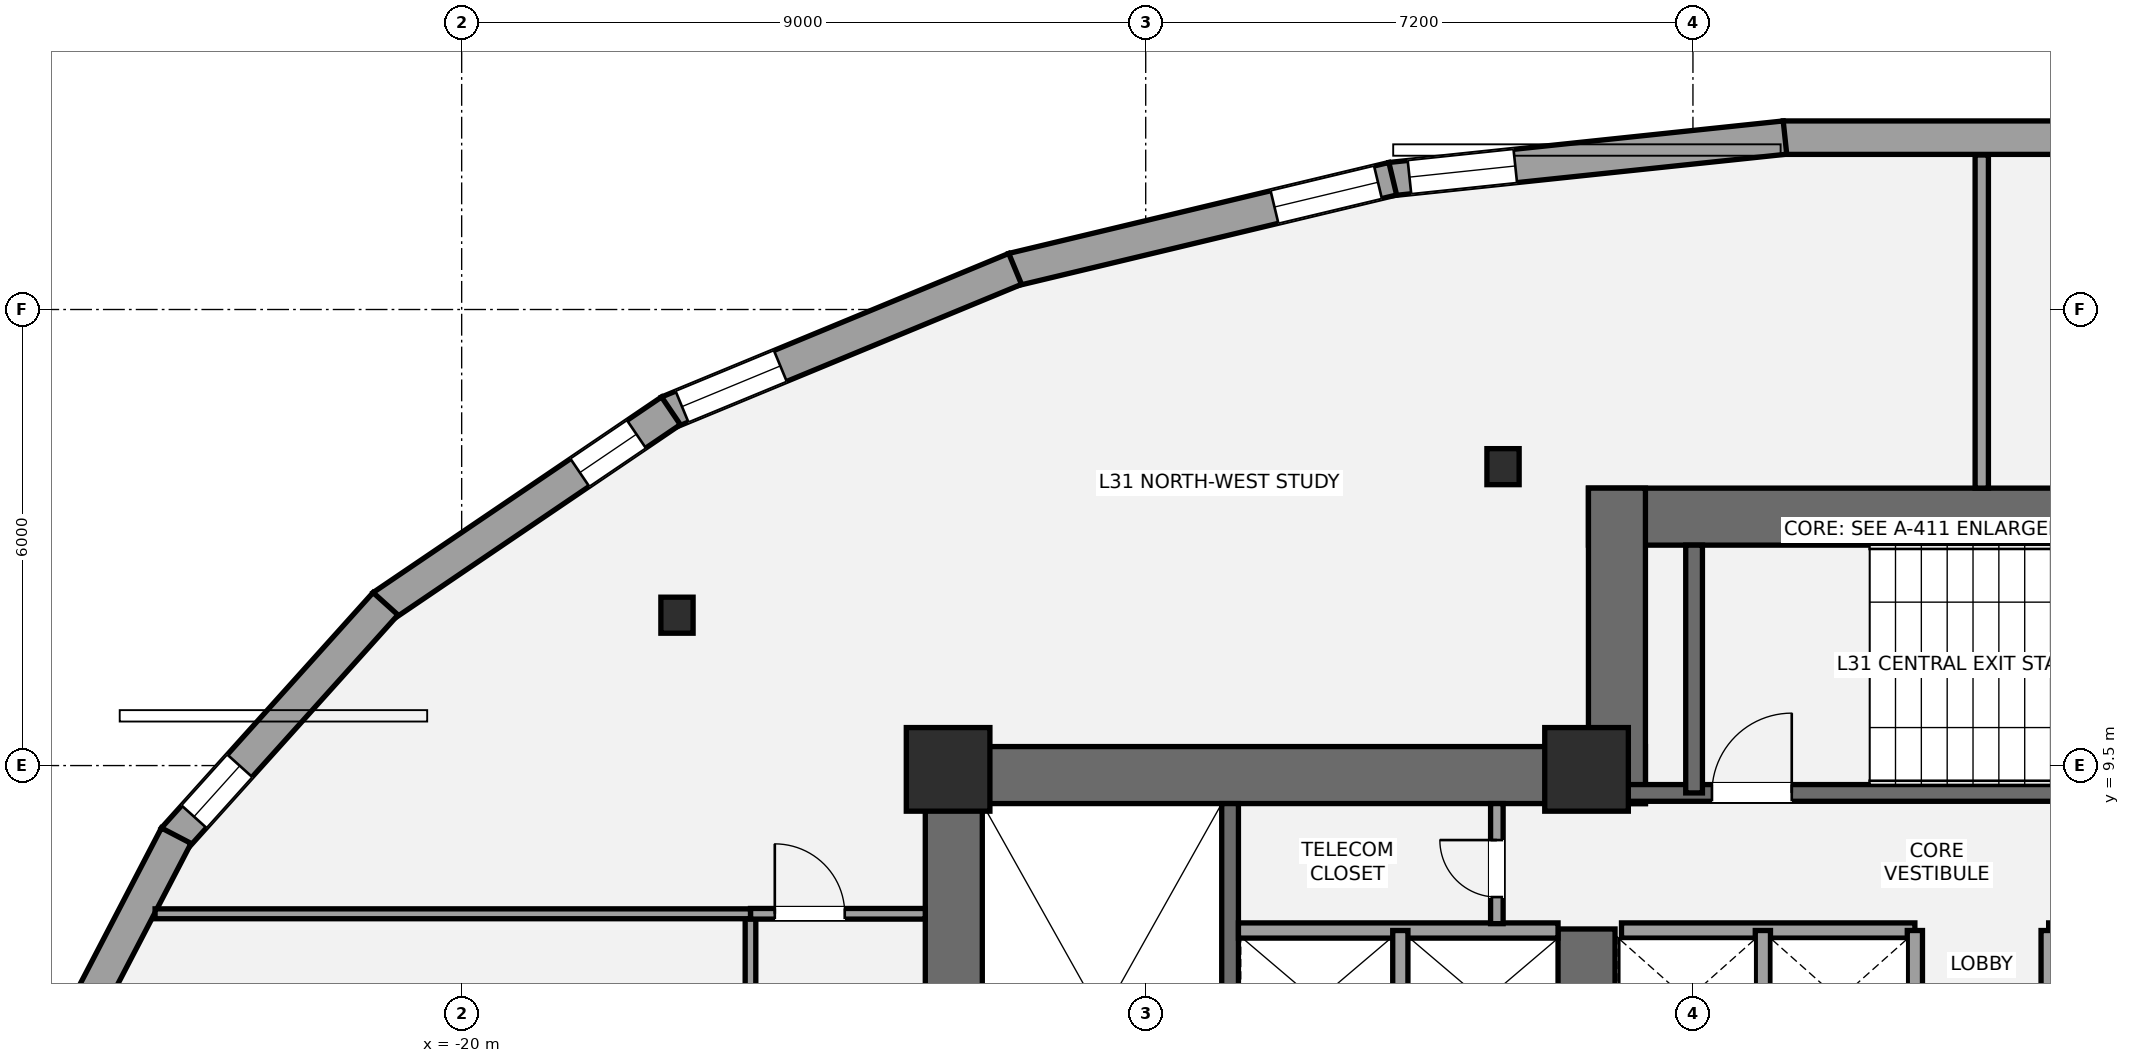
"""IFC4 building model, lengths in metres.
Left out: names, types, materials, properties, quantities, classifications, styles, units other than length and angle.
Written with IfcOpenShell. Run it as: python <this file> out.ifc"""

import sys

from ifc_helpers import new_model, si_unit, direction, frame, frame_2d, origin, origin_2d, place, context, subcontext, project, spatial, rectangle, i_section, extrude, element, fill, save


model = new_model("IFC4")
c1 = context("Model", 3, precision=1e-05, world=origin(), true_north=direction((0.0, 1.0)))
c2 = subcontext(c1, "Body", "Model", "MODEL_VIEW")
j1 = project(units=[si_unit("LENGTHUNIT", "METRE"), si_unit("PLANEANGLEUNIT", "RADIAN")], contexts=[c1])
p1 = place(None, origin())
s1 = spatial("IfcSite", under=j1, at=p1, CompositionType="ELEMENT")
p2 = place(p1, origin())
s2 = spatial("IfcBuilding", under=s1, at=p2, CompositionType="ELEMENT")
p3 = place(p2, frame((0.0, 0.0, 117.6)))
s3 = spatial("IfcBuildingStorey", under=s2, at=p3, CompositionType="ELEMENT", Elevation=117.6)
p4 = place(p3, frame((-13.525, 1.1, 0.0), z_axis=(0.0, 0.0, 1.0), x_axis=(0.0, 1.0, 0.0)))
e1 = element("IfcWall", 1, at=p4, inside=s3, PredefinedType="SHEAR", context=c2, shape_type="SweptSolid", body=[
    extrude(rectangle(XDim=8.65, YDim=0.75, at=frame_2d((4.325, 0.0))), origin(), (0.0, 0.0, 1.0), 3.5),
])
p5 = place(p3, frame((-13.9, 9.375, 0.0), z_axis=(0.0, 0.0, 1.0), x_axis=(1.0, 0.0, 0.0)))
e2 = element("IfcWall", 2, at=p5, inside=s3, PredefinedType="SHEAR", context=c2, shape_type="SweptSolid", body=[
    extrude(rectangle(XDim=9.475, YDim=0.75, at=frame_2d((4.737, 0.0))), origin(), (0.0, 0.0, 1.0), 3.5),
])
p6 = place(p3, frame((-5.2, 5.35, 0.0), z_axis=(0.0, 0.0, 1.0), x_axis=(0.0, 1.0, 0.0)))
e3 = element("IfcWall", 3, at=p6, inside=s3, PredefinedType="SHEAR", context=c2, shape_type="SweptSolid", body=[
    extrude(rectangle(XDim=2.0, YDim=0.75, at=frame_2d((1.0, 0.0))), origin(), (0.0, 0.0, 1.0), 3.5),
])
p7 = place(p3, frame((-9.89, 1.85, 0.0), z_axis=(0.0, 0.0, 1.0), x_axis=(0.0, 1.0, 0.0)))
e4 = element("IfcWall", 4, at=p7, inside=s3, PredefinedType="SHEAR", context=c2, shape_type="SweptSolid", body=[
    extrude(rectangle(XDim=7.15, YDim=0.22, at=frame_2d((3.575, 0.0))), origin(), (0.0, 0.0, 1.0), 3.5),
])
p8 = place(p3, frame((-5.175, 12.775, 0.0), z_axis=(0.0, 0.0, 1.0), x_axis=(1.0, 0.0, 0.0)))
e5 = element("IfcWall", 5, at=p8, inside=s3, PredefinedType="SHEAR", context=c2, shape_type="SweptSolid", body=[
    extrude(rectangle(XDim=10.35, YDim=0.75, at=frame_2d((5.175, 0.0))), origin(), (0.0, 0.0, 1.0), 3.5),
])
p9 = place(p3, frame((-4.8, 9.0, 0.0), z_axis=(0.0, 0.0, 1.0), x_axis=(0.0, 1.0, 0.0)))
e6 = element("IfcWall", 6, at=p9, inside=s3, PredefinedType="SHEAR", context=c2, shape_type="SweptSolid", body=[
    extrude(rectangle(XDim=4.15, YDim=0.75, at=frame_2d((2.075, 0.0))), origin(), (0.0, 0.0, 1.0), 3.5),
])
p10 = place(p3, frame((-4.7, 9.14, 0.0), z_axis=(0.0, 0.0, 1.0), x_axis=(1.0, 0.0, 0.0)))
e7 = element("IfcWall", 7, at=p10, inside=s3, PredefinedType="SHEAR", context=c2, shape_type="SweptSolid", body=[
    extrude(rectangle(XDim=9.3, YDim=0.22, at=frame_2d((4.65, 0.0))), origin(), (0.0, 0.0, 1.0), 3.5),
])
p11 = place(p10, frame((1.15, 0.0, 0.0)))
e8 = element("IfcOpeningElement", 8, at=p11, cuts=e7, PredefinedType="OPENING", context=c2, shape_type="SweptSolid", body=[
    extrude(rectangle(XDim=1.05, YDim=2.15, at=frame_2d((0.525, 1.075))), frame((0.0, 0.12, 0.0), z_axis=(0.0, -1.0, 0.0), x_axis=(1.0, 0.0, 0.0)), (0.0, 0.0, 1.0), 0.24),
])
p12 = place(p3, frame((-3.785, 9.14, 0.0), z_axis=(0.0, 0.0, 1.0), x_axis=(0.0, 1.0, 0.0)))
e9 = element("IfcWall", 9, at=p12, inside=s3, PredefinedType="SHEAR", context=c2, shape_type="SweptSolid", body=[
    extrude(rectangle(XDim=3.26, YDim=0.22, at=frame_2d((1.63, 0.0))), origin(), (0.0, 0.0, 1.0), 3.5),
])
for number, where, z_axis, x_axis in (
    (10, (-13.6, 9.45, 0.0), (0.0, 0.0, 1.0), (1.0, 0.0, 0.0)),
    (11, (-5.2, 9.45, 0.0), (0.0, 0.0, 1.0), (1.0, 0.0, 0.0)),
):
    element("IfcColumn", number, at=place(p3, frame(where, z_axis=z_axis, x_axis=x_axis)), inside=s3, PredefinedType="COLUMN", context=c2, shape_type="SweptSolid", body=[
        extrude(rectangle(XDim=1.1, YDim=1.1, at=origin_2d()), origin(), (0.0, 0.0, 1.0), 3.5),
    ])
for number, where, z_axis, x_axis in (
    (12, (-6.299, 13.433, 0.0), (0.0, 0.0, 1.0), (1.0, 0.0, 0.0)),
    (13, (-17.167, 11.478, 0.0), (0.0, 0.0, 1.0), (1.0, 0.0, 0.0)),
):
    element("IfcColumn", number, at=place(p3, frame(where, z_axis=z_axis, x_axis=x_axis)), inside=s3, PredefinedType="COLUMN", context=c2, shape_type="SweptSolid", body=[
        extrude(i_section(OverallWidth=0.424, OverallDepth=0.474, WebThickness=0.048, FlangeThickness=0.077, at=origin_2d()), origin(), (0.0, 0.0, 1.0), 3.5),
    ])
p13 = place(p3, frame((-2.612, 17.761, 0.0), z_axis=(0.0, 0.0, 1.0), x_axis=(1.0, 0.0, 0.0)))
e14 = element("IfcWall", 14, at=p13, inside=s3, PredefinedType="STANDARD", context=c2, shape_type="SweptSolid", body=[
    extrude(rectangle(XDim=5.225, YDim=0.44, at=frame_2d((2.612, 0.0))), origin(), (0.0, 0.0, 1.0), 2.528),
])
p14 = place(p13, frame((3.575, 0.0, 0.58)))
e15 = element("IfcOpeningElement", 15, at=p14, cuts=e14, PredefinedType="OPENING", context=c2, shape_type="SweptSolid", body=[
    extrude(rectangle(XDim=1.4, YDim=1.55, at=frame_2d((0.7, 0.775))), frame((0.0, 0.23, 0.0), z_axis=(0.0, -1.0, 0.0), x_axis=(1.0, 0.0, 0.0)), (0.0, 0.0, 1.0), 0.46),
])
p15 = place(p3, frame((-7.778, 17.216, 0.0), z_axis=(0.0, 0.0, 1.0), x_axis=(0.994501349718, 0.104723757619, 0.0)))
e16 = element("IfcWall", 16, at=p15, inside=s3, PredefinedType="STANDARD", context=c2, shape_type="SweptSolid", body=[
    extrude(rectangle(XDim=5.218, YDim=0.44, at=frame_2d((2.609, 0.0))), origin(), (0.0, 0.0, 1.0), 2.528),
])
p16 = place(p15, frame((0.25, 0.0, 0.58)))
e17 = element("IfcOpeningElement", 17, at=p16, cuts=e16, PredefinedType="OPENING", context=c2, shape_type="SweptSolid", body=[
    extrude(rectangle(XDim=1.4, YDim=1.55, at=frame_2d((0.7, 0.775))), frame((0.0, 0.23, 0.0), z_axis=(0.0, -1.0, 0.0), x_axis=(1.0, 0.0, 0.0)), (0.0, 0.0, 1.0), 0.46),
])
p17 = place(p3, frame((-12.751, 16.024, 0.0), z_axis=(0.0, 0.0, 1.0), x_axis=(0.972539655933, 0.232737228734, 0.0)))
e18 = element("IfcWall", 18, at=p17, inside=s3, PredefinedType="STANDARD", context=c2, shape_type="SweptSolid", body=[
    extrude(rectangle(XDim=5.142, YDim=0.44, at=frame_2d((2.571, 0.0))), origin(), (0.0, 0.0, 1.0), 2.528),
])
p18 = place(p17, frame((3.542, 0.0, 0.45)))
e19 = element("IfcOpeningElement", 19, at=p18, cuts=e18, PredefinedType="OPENING", context=c2, shape_type="SweptSolid", body=[
    extrude(rectangle(XDim=1.4, YDim=1.55, at=frame_2d((0.7, 0.775))), frame((0.0, 0.23, 0.0), z_axis=(0.0, -1.0, 0.0), x_axis=(1.0, 0.0, 0.0)), (0.0, 0.0, 1.0), 0.46),
])
p19 = place(p3, frame((-17.286, 14.146, 0.0), z_axis=(0.0, 0.0, 1.0), x_axis=(0.924140141084, 0.382053660678, 0.0)))
e20 = element("IfcWall", 20, at=p19, inside=s3, PredefinedType="STANDARD", context=c2, shape_type="SweptSolid", body=[
    extrude(rectangle(XDim=4.943, YDim=0.44, at=frame_2d((2.471, 0.0))), origin(), (0.0, 0.0, 1.0), 2.528),
])
p20 = place(p19, frame((0.2, 0.0, 0.45)))
e21 = element("IfcOpeningElement", 21, at=p20, cuts=e20, PredefinedType="OPENING", context=c2, shape_type="SweptSolid", body=[
    extrude(rectangle(XDim=1.4, YDim=1.55, at=frame_2d((0.7, 0.775))), frame((0.0, 0.23, 0.0), z_axis=(0.0, -1.0, 0.0), x_axis=(1.0, 0.0, 0.0)), (0.0, 0.0, 1.0), 0.46),
])
p21 = place(p3, frame((-21.042, 11.594, 0.0), z_axis=(0.0, 0.0, 1.0), x_axis=(0.827700115196, 0.561170668607, 0.0)))
e22 = element("IfcWall", 22, at=p21, inside=s3, PredefinedType="STANDARD", context=c2, shape_type="SweptSolid", body=[
    extrude(rectangle(XDim=4.585, YDim=0.44, at=frame_2d((2.293, 0.0))), origin(), (0.0, 0.0, 1.0), 2.528),
])
p22 = place(p21, frame((3.137, 0.0, 0.58)))
e23 = element("IfcOpeningElement", 23, at=p22, cuts=e22, PredefinedType="OPENING", context=c2, shape_type="SweptSolid", body=[
    extrude(rectangle(XDim=0.9, YDim=1.35, at=frame_2d((0.45, 0.675))), frame((0.0, 0.23, 0.0), z_axis=(0.0, -1.0, 0.0), x_axis=(1.0, 0.0, 0.0)), (0.0, 0.0, 1.0), 0.46),
])
p23 = place(p3, frame((-23.787, 8.532, 0.0), z_axis=(0.0, 0.0, 1.0), x_axis=(0.668754222456, 0.743483550556, 0.0)))
e24 = element("IfcWall", 24, at=p23, inside=s3, PredefinedType="STANDARD", context=c2, shape_type="SweptSolid", body=[
    extrude(rectangle(XDim=4.166, YDim=0.44, at=frame_2d((2.083, 0.0))), origin(), (0.0, 0.0, 1.0), 2.528),
])
p24 = place(p23, frame((0.398, 0.0, 0.58)))
e25 = element("IfcOpeningElement", 25, at=p24, cuts=e24, PredefinedType="OPENING", context=c2, shape_type="SweptSolid", body=[
    extrude(rectangle(XDim=0.9, YDim=1.35, at=frame_2d((0.45, 0.675))), frame((0.0, 0.23, 0.0), z_axis=(0.0, -1.0, 0.0), x_axis=(1.0, 0.0, 0.0)), (0.0, 0.0, 1.0), 0.46),
])
p25 = place(p3, frame((-25.521, 5.187, 0.0), z_axis=(0.0, 0.0, 1.0), x_axis=(0.461766944701, 0.88700129018, 0.0)))
e26 = element("IfcWall", 26, at=p25, inside=s3, PredefinedType="STANDARD", context=c2, shape_type="SweptSolid", body=[
    extrude(rectangle(XDim=3.823, YDim=0.44, at=frame_2d((1.911, 0.0))), origin(), (0.0, 0.0, 1.0), 2.528),
])
p26 = place(p25, frame((0.2, 0.0, 0.92)))
e27 = element("IfcOpeningElement", 27, at=p26, cuts=e26, PredefinedType="OPENING", context=c2, shape_type="SweptSolid", body=[
    extrude(rectangle(XDim=0.9, YDim=1.35, at=frame_2d((0.45, 0.675))), frame((0.0, 0.23, 0.0), z_axis=(0.0, -1.0, 0.0), x_axis=(1.0, 0.0, 0.0)), (0.0, 0.0, 1.0), 0.46),
])
p27 = place(p3, frame((-9.78, 7.33, 0.0), z_axis=(0.0, 0.0, 1.0), x_axis=(1.0, 0.0, 0.0)))
e28 = element("IfcWall", 28, at=p27, inside=s3, PredefinedType="SOLIDWALL", context=c2, shape_type="SweptSolid", body=[
    extrude(rectangle(XDim=4.205, YDim=0.2, at=frame_2d((2.103, 0.0))), origin(), (0.0, 0.0, 1.0), 3.31),
])
p28 = place(p3, frame((-7.65, 5.47, 0.0), z_axis=(0.0, 0.0, 1.0), x_axis=(0.0, 1.0, 0.0)))
e29 = element("IfcWall", 29, at=p28, inside=s3, PredefinedType="SOLIDWALL", context=c2, shape_type="SweptSolid", body=[
    extrude(rectangle(XDim=1.86, YDim=0.2, at=frame_2d((0.93, 0.0))), origin(), (0.0, 0.0, 1.0), 3.31),
])
for number, where, z_axis, x_axis in (
    (30, (-4.74, 7.33, 0.0), (0.0, 0.0, 1.0), (1.0, 0.0, 0.0)),
    (31, (0.88, 7.33, 0.0), (0.0, 0.0, 1.0), (1.0, 0.0, 0.0)),
):
    element("IfcWall", number, at=place(p3, frame(where, z_axis=z_axis, x_axis=x_axis)), inside=s3, PredefinedType="SOLIDWALL", context=c2, shape_type="SweptSolid", body=[
        extrude(rectangle(XDim=3.86, YDim=0.2, at=frame_2d((1.93, 0.0))), origin(), (0.0, 0.0, 1.0), 3.31),
    ])
for number, where, z_axis, x_axis in (
    (32, (-2.88, 5.52, 0.0), (0.0, 0.0, 1.0), (0.0, 1.0, 0.0)),
    (33, (-0.88, 5.52, 0.0), (0.0, 0.0, 1.0), (0.0, 1.0, 0.0)),
    (34, (0.88, 5.52, 0.0), (0.0, 0.0, 1.0), (0.0, 1.0, 0.0)),
):
    element("IfcWall", number, at=place(p3, frame(where, z_axis=z_axis, x_axis=x_axis)), inside=s3, PredefinedType="SOLIDWALL", context=c2, shape_type="SweptSolid", body=[
        extrude(rectangle(XDim=1.81, YDim=0.2, at=frame_2d((0.905, 0.0))), origin(), (0.0, 0.0, 1.0), 3.31),
    ])
p29 = place(p3, frame((-6.38, 7.42, 0.0), z_axis=(0.0, 0.0, 1.0), x_axis=(0.0, 1.0, 0.0)))
e35 = element("IfcWall", 35, at=p29, inside=s3, PredefinedType="PARTITIONING", context=c2, shape_type="SweptSolid", body=[
    extrude(rectangle(XDim=1.58, YDim=0.165, at=frame_2d((0.79, 0.0))), origin(), (0.0, 0.0, 1.0), 3.31),
])
p30 = place(p29, frame((0.35, 0.0, 0.0)))
e36 = element("IfcOpeningElement", 36, at=p30, cuts=e35, PredefinedType="OPENING", context=c2, shape_type="SweptSolid", body=[
    extrude(rectangle(XDim=0.75, YDim=2.1, at=frame_2d((0.375, 1.05))), frame((0.0, 0.093, 0.0), z_axis=(0.0, -1.0, 0.0), x_axis=(1.0, 0.0, 0.0)), (0.0, 0.0, 1.0), 0.185),
])
p31 = place(p3, frame((-16.2, -14.348, 0.0), z_axis=(0.0, 0.0, 1.0), x_axis=(0.0, 1.0, 0.0)))
e37 = element("IfcWall", 37, at=p31, inside=s3, PredefinedType="PARTITIONING", context=c2, shape_type="SweptSolid", body=[
    extrude(rectangle(XDim=21.898, YDim=0.14, at=frame_2d((10.949, 0.0))), origin(), (0.0, 0.0, 1.0), 2.763),
])
p32 = place(p31, frame((10.198, 0.0, 0.0)))
e38 = element("IfcOpeningElement", 38, at=p32, cuts=e37, PredefinedType="OPENING", context=c2, shape_type="SweptSolid", body=[
    extrude(rectangle(XDim=0.9, YDim=2.1, at=frame_2d((0.45, 1.05))), frame((0.0, 0.08, 0.0), z_axis=(0.0, -1.0, 0.0), x_axis=(1.0, 0.0, 0.0)), (0.0, 0.0, 1.0), 0.16),
])
p33 = place(p31, frame((14.998, 0.0, 0.0)))
e39 = element("IfcOpeningElement", 39, at=p33, cuts=e37, PredefinedType="OPENING", context=c2, shape_type="SweptSolid", body=[
    extrude(rectangle(XDim=0.9, YDim=2.1, at=frame_2d((0.45, 1.05))), frame((0.0, 0.08, 0.0), z_axis=(0.0, -1.0, 0.0), x_axis=(1.0, 0.0, 0.0)), (0.0, 0.0, 1.0), 0.16),
])
p34 = place(p31, frame((19.373, 0.0, 0.0)))
e40 = element("IfcOpeningElement", 40, at=p34, cuts=e37, PredefinedType="OPENING", context=c2, shape_type="SweptSolid", body=[
    extrude(rectangle(XDim=0.9, YDim=2.1, at=frame_2d((0.45, 1.05))), frame((0.0, 0.08, 0.0), z_axis=(0.0, -1.0, 0.0), x_axis=(1.0, 0.0, 0.0)), (0.0, 0.0, 1.0), 0.16),
])
p35 = place(p3, frame((-16.2, 7.55, 0.0), z_axis=(0.0, 0.0, 1.0), x_axis=(1.0, 0.0, 0.0)))
e41 = element("IfcWall", 41, at=p35, inside=s3, PredefinedType="PARTITIONING", context=c2, shape_type="SweptSolid", body=[
    extrude(rectangle(XDim=2.3, YDim=0.14, at=frame_2d((1.15, 0.0))), origin(), (0.0, 0.0, 1.0), 2.763),
])
p36 = place(p35, frame((0.32, 0.0, 0.0)))
e42 = element("IfcOpeningElement", 42, at=p36, cuts=e41, PredefinedType="OPENING", context=c2, shape_type="SweptSolid", body=[
    extrude(rectangle(XDim=0.92, YDim=2.15, at=frame_2d((0.46, 1.075))), frame((0.0, 0.08, 0.0), z_axis=(0.0, -1.0, 0.0), x_axis=(1.0, 0.0, 0.0)), (0.0, 0.0, 1.0), 0.16),
])
p37 = place(p3, frame((0.0, 13.15, 0.0), z_axis=(0.0, 0.0, 1.0), x_axis=(0.0, 1.0, 0.0)))
e43 = element("IfcWall", 43, at=p37, inside=s3, PredefinedType="PARTITIONING", context=c2, shape_type="SweptSolid", body=[
    extrude(rectangle(XDim=4.383, YDim=0.175, at=frame_2d((2.191, 0.0))), origin(), (0.0, 0.0, 1.0), 3.31),
])
p38 = place(p3, frame((-24.034, 7.55, 0.0), z_axis=(0.0, 0.0, 1.0), x_axis=(1.0, 0.0, 0.0)))
e44 = element("IfcWall", 44, at=p38, inside=s3, PredefinedType="PARTITIONING", context=c2, shape_type="SweptSolid", body=[
    extrude(rectangle(XDim=7.834, YDim=0.13, at=frame_2d((3.917, 0.0))), origin(), (0.0, 0.0, 1.0), 3.31),
])
p39 = place(p16, origin())
e45 = element("IfcWindow", 45, at=p39, inside=s3, PartitioningType="SINGLE_PANEL", PredefinedType="WINDOW", context=c2, shape_type="SweptSolid", body=[
    extrude(rectangle(XDim=1.4, YDim=1.55, at=frame_2d((0.7, 0.775))), frame((0.0, -0.01, 0.0), z_axis=(0.0, -1.0, 0.0), x_axis=(1.0, 0.0, 0.0)), (0.0, 0.0, 1.0), 0.06),
])
fill(e17, e45)
p40 = place(p18, origin())
e46 = element("IfcWindow", 46, at=p40, inside=s3, PartitioningType="SINGLE_PANEL", PredefinedType="WINDOW", context=c2, shape_type="SweptSolid", body=[
    extrude(rectangle(XDim=1.4, YDim=1.55, at=frame_2d((0.7, 0.775))), frame((0.0, -0.01, 0.0), z_axis=(0.0, -1.0, 0.0), x_axis=(1.0, 0.0, 0.0)), (0.0, 0.0, 1.0), 0.06),
])
fill(e19, e46)
p41 = place(p20, origin())
e47 = element("IfcWindow", 47, at=p41, inside=s3, PartitioningType="SINGLE_PANEL", PredefinedType="WINDOW", context=c2, shape_type="SweptSolid", body=[
    extrude(rectangle(XDim=1.4, YDim=1.55, at=frame_2d((0.7, 0.775))), frame((0.0, -0.01, 0.0), z_axis=(0.0, -1.0, 0.0), x_axis=(1.0, 0.0, 0.0)), (0.0, 0.0, 1.0), 0.06),
])
fill(e21, e47)
p42 = place(p22, origin())
e48 = element("IfcWindow", 48, at=p42, inside=s3, PartitioningType="SINGLE_PANEL", PredefinedType="WINDOW", context=c2, shape_type="SweptSolid", body=[
    extrude(rectangle(XDim=0.9, YDim=1.35, at=frame_2d((0.45, 0.675))), frame((0.0, -0.01, 0.0), z_axis=(0.0, -1.0, 0.0), x_axis=(1.0, 0.0, 0.0)), (0.0, 0.0, 1.0), 0.06),
])
fill(e23, e48)
p43 = place(p24, origin())
e49 = element("IfcWindow", 49, at=p43, inside=s3, PartitioningType="SINGLE_PANEL", PredefinedType="WINDOW", context=c2, shape_type="SweptSolid", body=[
    extrude(rectangle(XDim=0.9, YDim=1.35, at=frame_2d((0.45, 0.675))), frame((0.0, -0.01, 0.0), z_axis=(0.0, -1.0, 0.0), x_axis=(1.0, 0.0, 0.0)), (0.0, 0.0, 1.0), 0.06),
])
fill(e25, e49)
p44 = place(p11, origin())
e50 = element("IfcDoor", 50, at=p44, inside=s3, OperationType="SINGLE_SWING_RIGHT", PredefinedType="DOOR", context=c2, shape_type="SweptSolid", body=[
    extrude(rectangle(XDim=1.05, YDim=2.15, at=frame_2d((0.525, 1.075))), frame((0.0, 0.025, 0.0), z_axis=(0.0, -1.0, 0.0), x_axis=(1.0, 0.0, 0.0)), (0.0, 0.0, 1.0), 0.05),
])
fill(e8, e50)
p45 = place(p30, origin())
e51 = element("IfcDoor", 51, at=p45, inside=s3, OperationType="SINGLE_SWING_RIGHT", PredefinedType="DOOR", context=c2, shape_type="SweptSolid", body=[
    extrude(rectangle(XDim=0.75, YDim=2.1, at=frame_2d((0.375, 1.05))), frame((0.0, 0.025, 0.0), z_axis=(0.0, -1.0, 0.0), x_axis=(1.0, 0.0, 0.0)), (0.0, 0.0, 1.0), 0.05),
])
fill(e36, e51)
p46 = place(p36, origin())
e52 = element("IfcDoor", 52, at=p46, inside=s3, OperationType="SINGLE_SWING_LEFT", PredefinedType="DOOR", context=c2, shape_type="SweptSolid", body=[
    extrude(rectangle(XDim=0.92, YDim=2.15, at=frame_2d((0.46, 1.075))), frame((0.0, 0.025, 0.0), z_axis=(0.0, -1.0, 0.0), x_axis=(1.0, 0.0, 0.0)), (0.0, 0.0, 1.0), 0.05),
])
fill(e42, e52)
save(model, sys.argv[1])
